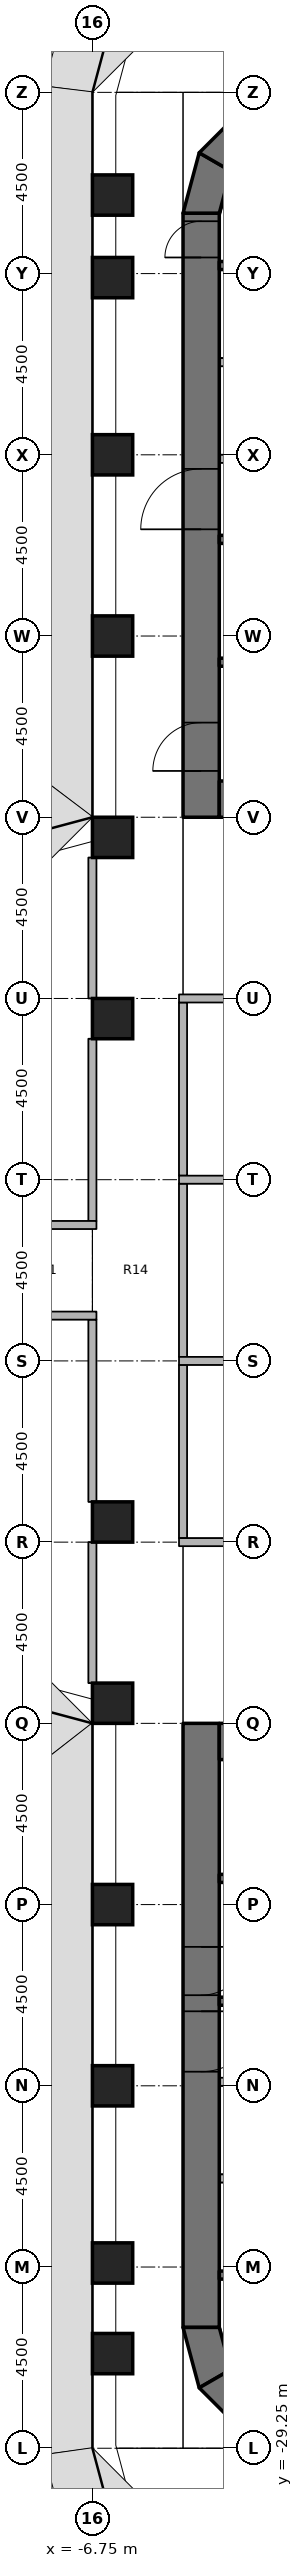
"""IFC4 building model, lengths in metres.
Left out: names, types, materials, properties, quantities, classifications, styles, units other than length and angle.
Written with IfcOpenShell. Run it as: python <this file> out.ifc"""

import sys

from ifc_helpers import new_model, si_unit, direction, frame, frame_2d, origin, origin_2d, place, context, subcontext, project, spatial, polyline, rectangle, outline, extrude, element, fill, save


model = new_model("IFC4")
c1 = context("Model", 3, precision=1e-05, world=origin(), true_north=direction((0.0, 1.0)))
c2 = subcontext(c1, "Body", "Model", "MODEL_VIEW")
j1 = project(units=[si_unit("LENGTHUNIT", "METRE"), si_unit("PLANEANGLEUNIT", "RADIAN")], contexts=[c1])
p1 = place(None, origin())
s1 = spatial("IfcSite", under=j1, at=p1, CompositionType="ELEMENT")
p2 = place(p1, origin())
s2 = spatial("IfcBuilding", under=s1, at=p2, CompositionType="ELEMENT")
p3 = place(p2, frame((0.0, 0.0, 69.0)))
s3 = spatial("IfcBuildingStorey", under=s2, at=p3, CompositionType="ELEMENT", Elevation=69.0)
for number, where, z_axis, x_axis in (
    (1, (-6.25, -26.9, 0.0), (0.0, 0.0, 1.0), (1.0, 0.0, 0.0)),
    (2, (-6.25, -24.65, 0.0), (0.0, 0.0, 1.0), (1.0, 0.0, 0.0)),
    (3, (-6.25, -20.25, 0.0), (0.0, 0.0, 1.0), (1.0, 0.0, 0.0)),
    (4, (-6.25, -15.75, 0.0), (0.0, 0.0, 1.0), (1.0, 0.0, 0.0)),
    (5, (-6.25, -10.75, 0.0), (0.0, 0.0, 1.0), (1.0, 0.0, 0.0)),
    (6, (-6.25, -6.25, 0.0), (0.0, 0.0, 1.0), (1.0, 0.0, 0.0)),
    (7, (-6.25, 6.25, 0.0), (0.0, 0.0, 1.0), (1.0, 0.0, 0.0)),
    (8, (-6.25, 10.75, 0.0), (0.0, 0.0, 1.0), (1.0, 0.0, 0.0)),
    (9, (-6.25, 15.75, 0.0), (0.0, 0.0, 1.0), (1.0, 0.0, 0.0)),
    (10, (-6.25, 20.25, 0.0), (0.0, 0.0, 1.0), (1.0, 0.0, 0.0)),
    (11, (-6.25, 24.65, 0.0), (0.0, 0.0, 1.0), (1.0, 0.0, 0.0)),
    (12, (-6.25, 26.7, 0.0), (0.0, 0.0, 1.0), (1.0, 0.0, 0.0)),
):
    element("IfcColumn", number, at=place(p3, frame(where, z_axis=z_axis, x_axis=x_axis)), inside=s3, PredefinedType="COLUMN", context=c2, shape_type="SweptSolid", body=[
        extrude(rectangle(XDim=1.0, YDim=1.0, at=origin_2d()), origin(), (0.0, 0.0, 1.0), 4.05),
    ])
p4 = place(p3, frame((-4.05, 11.25, 0.0), z_axis=(0.0, 0.0, 1.0), x_axis=(0.0, 1.0, 0.0)))
e13 = element("IfcWall", 13, at=p4, inside=s3, PredefinedType="SHEAR", context=c2, shape_type="SweptSolid", body=[
    extrude(rectangle(XDim=15.0, YDim=0.9, at=frame_2d((7.5, 0.0))), origin(), (0.0, 0.0, 1.0), 4.2),
])
p5 = place(p4, frame((7.15, 0.0, 0.0)))
e14 = element("IfcOpeningElement", 14, at=p5, cuts=e13, PredefinedType="OPENING", context=c2, shape_type="SweptSolid", body=[
    extrude(rectangle(XDim=1.5, YDim=2.3, at=frame_2d((0.75, 1.15))), frame((0.0, 0.46, 0.0), z_axis=(0.0, -1.0, 0.0), x_axis=(1.0, 0.0, 0.0)), (0.0, 0.0, 1.0), 0.92),
])
p6 = place(p4, frame((13.9, 0.0, 0.0)))
e15 = element("IfcOpeningElement", 15, at=p6, cuts=e13, PredefinedType="OPENING", context=c2, shape_type="SweptSolid", body=[
    extrude(rectangle(XDim=0.9, YDim=2.1, at=frame_2d((0.45, 1.05))), frame((0.0, 0.46, 0.0), z_axis=(0.0, -1.0, 0.0), x_axis=(1.0, 0.0, 0.0)), (0.0, 0.0, 1.0), 0.92),
])
p7 = place(p4, frame((1.15, 0.0, 0.0)))
e16 = element("IfcOpeningElement", 16, at=p7, cuts=e13, PredefinedType="OPENING", context=c2, shape_type="SweptSolid", body=[
    extrude(rectangle(XDim=1.2, YDim=2.1, at=frame_2d((0.6, 1.05))), frame((0.0, 0.46, 0.0), z_axis=(0.0, -1.0, 0.0), x_axis=(1.0, 0.0, 0.0)), (0.0, 0.0, 1.0), 0.92),
])
p8 = place(p3, frame((-3.6, 11.7, 0.0), z_axis=(0.0, 0.0, 1.0), x_axis=(1.0, 0.0, 0.0)))
e17 = element("IfcWall", 17, at=p8, inside=s3, PredefinedType="SHEAR", context=c2, shape_type="SweptSolid", body=[
    extrude(rectangle(XDim=7.2, YDim=0.9, at=frame_2d((3.6, 0.0))), origin(), (0.0, 0.0, 1.0), 4.2),
])
p9 = place(p3, origin())
e18 = element("IfcWall", 18, at=p9, inside=s3, PredefinedType="SHEAR", context=c2, shape_type="SweptSolid", body=[
    extrude(outline(polyline([(-4.5, 26.25), (-4.098, 27.75), (-3.319, 27.3), (-3.6, 26.25), (-4.5, 26.25)])), origin(), (0.0, 0.0, 1.0), 4.2),
])
p10 = place(p3, origin())
e19 = element("IfcWall", 19, at=p10, inside=s3, PredefinedType="SHEAR", context=c2, shape_type="SweptSolid", body=[
    extrude(outline(polyline([(-4.098, 27.75), (-3.0, 28.848), (-2.55, 28.069), (-3.319, 27.3), (-4.098, 27.75)])), origin(), (0.0, 0.0, 1.0), 4.2),
])
p11 = place(p3, frame((-4.05, -11.25, 0.0), z_axis=(0.0, 0.0, 1.0), x_axis=(0.0, -1.0, 0.0)))
e20 = element("IfcWall", 20, at=p11, inside=s3, PredefinedType="SHEAR", context=c2, shape_type="SweptSolid", body=[
    extrude(rectangle(XDim=15.0, YDim=0.9, at=frame_2d((7.5, 0.0))), origin(), (0.0, 0.0, 1.0), 4.2),
])
p12 = place(p11, frame((7.15, 0.0, 0.0)))
e21 = element("IfcOpeningElement", 21, at=p12, cuts=e20, PredefinedType="OPENING", context=c2, shape_type="SweptSolid", body=[
    extrude(rectangle(XDim=1.5, YDim=2.3, at=frame_2d((0.75, 1.15))), frame((0.0, 0.46, 0.0), z_axis=(0.0, -1.0, 0.0), x_axis=(1.0, 0.0, 0.0)), (0.0, 0.0, 1.0), 0.92),
])
p13 = place(p11, frame((5.55, 0.0, 0.0)))
e22 = element("IfcOpeningElement", 22, at=p13, cuts=e20, PredefinedType="OPENING", context=c2, shape_type="SweptSolid", body=[
    extrude(rectangle(XDim=1.2, YDim=2.1, at=frame_2d((0.6, 1.05))), frame((0.0, 0.46, 0.0), z_axis=(0.0, -1.0, 0.0), x_axis=(1.0, 0.0, 0.0)), (0.0, 0.0, 1.0), 0.92),
])
p14 = place(p3, frame((-3.6, -11.7, 0.0), z_axis=(0.0, 0.0, 1.0), x_axis=(1.0, 0.0, 0.0)))
e23 = element("IfcWall", 23, at=p14, inside=s3, PredefinedType="SHEAR", context=c2, shape_type="SweptSolid", body=[
    extrude(rectangle(XDim=7.2, YDim=0.9, at=frame_2d((3.6, 0.0))), origin(), (0.0, 0.0, 1.0), 4.2),
])
p15 = place(p3, origin())
e24 = element("IfcWall", 24, at=p15, inside=s3, PredefinedType="SHEAR", context=c2, shape_type="SweptSolid", body=[
    extrude(outline(polyline([(-4.5, -26.25), (-4.098, -27.75), (-3.319, -27.3), (-3.6, -26.25), (-4.5, -26.25)])), origin(), (0.0, 0.0, 1.0), 4.2),
])
p16 = place(p3, origin())
e25 = element("IfcWall", 25, at=p16, inside=s3, PredefinedType="SHEAR", context=c2, shape_type="SweptSolid", body=[
    extrude(outline(polyline([(-4.098, -27.75), (-3.0, -28.848), (-2.55, -28.069), (-3.319, -27.3), (-4.098, -27.75)])), origin(), (0.0, 0.0, 1.0), 4.2),
])
for number, where, z_axis, x_axis in (
    (26, (-3.6, 24.95, 0.0), (0.0, 0.0, 1.0), (1.0, 0.0, 0.0)),
    (27, (-3.6, 18.15, 0.0), (0.0, 0.0, 1.0), (1.0, 0.0, 0.0)),
    (28, (-3.6, 15.1, 0.0), (0.0, 0.0, 1.0), (1.0, 0.0, 0.0)),
):
    element("IfcWall", number, at=place(p3, frame(where, z_axis=z_axis, x_axis=x_axis)), inside=s3, PredefinedType="SHEAR", context=c2, shape_type="SweptSolid", body=[
        extrude(rectangle(XDim=7.2, YDim=0.2, at=frame_2d((3.6, 0.0))), origin(), (0.0, 0.0, 1.0), 4.05),
    ])
p17 = place(p3, frame((-3.6, 20.15, 0.0), z_axis=(0.0, 0.0, 1.0), x_axis=(1.0, 0.0, 0.0)))
e29 = element("IfcWall", 29, at=p17, inside=s3, PredefinedType="PARTITIONING", context=c2, shape_type="SweptSolid", body=[
    extrude(rectangle(XDim=2.7, YDim=0.2, at=frame_2d((1.35, 0.0))), origin(), (0.0, 0.0, 1.0), 4.05),
])
p18 = place(p3, frame((-3.6, 22.55, 0.0), z_axis=(0.0, 0.0, 1.0), x_axis=(1.0, 0.0, 0.0)))
e30 = element("IfcWall", 30, at=p18, inside=s3, PredefinedType="PARTITIONING", context=c2, shape_type="SweptSolid", body=[
    extrude(rectangle(XDim=2.5, YDim=0.2, at=frame_2d((1.25, 0.0))), origin(), (0.0, 0.0, 1.0), 4.05),
])
for number, where, z_axis, x_axis in (
    (31, (3.6, -24.95, 0.0), (0.0, 0.0, 1.0), (-1.0, 0.0, 0.0)),
    (32, (3.6, -18.15, 0.0), (0.0, 0.0, 1.0), (-1.0, 0.0, 0.0)),
    (33, (3.6, -15.1, 0.0), (0.0, 0.0, 1.0), (-1.0, 0.0, 0.0)),
):
    element("IfcWall", number, at=place(p3, frame(where, z_axis=z_axis, x_axis=x_axis)), inside=s3, PredefinedType="SHEAR", context=c2, shape_type="SweptSolid", body=[
        extrude(rectangle(XDim=7.2, YDim=0.2, at=frame_2d((3.6, 0.0))), origin(), (0.0, 0.0, 1.0), 4.05),
    ])
p19 = place(p3, frame((-0.9, -20.15, 0.0), z_axis=(0.0, 0.0, 1.0), x_axis=(-1.0, 0.0, 0.0)))
e34 = element("IfcWall", 34, at=p19, inside=s3, PredefinedType="PARTITIONING", context=c2, shape_type="SweptSolid", body=[
    extrude(rectangle(XDim=2.7, YDim=0.2, at=frame_2d((1.35, 0.0))), origin(), (0.0, 0.0, 1.0), 4.05),
])
p20 = place(p3, frame((-1.1, -22.55, 0.0), z_axis=(0.0, 0.0, 1.0), x_axis=(-1.0, 0.0, 0.0)))
e35 = element("IfcWall", 35, at=p20, inside=s3, PredefinedType="PARTITIONING", context=c2, shape_type="SweptSolid", body=[
    extrude(rectangle(XDim=2.5, YDim=0.2, at=frame_2d((1.25, 0.0))), origin(), (0.0, 0.0, 1.0), 4.05),
])
for number, where, z_axis, x_axis in (
    (36, (-4.5, 2.35, 0.0), (0.0, 0.0, 1.0), (0.0, 1.0, 0.0)),
    (37, (-4.5, -2.15, 0.0), (0.0, 0.0, 1.0), (0.0, 1.0, 0.0)),
    (38, (-4.5, -6.65, 0.0), (0.0, 0.0, 1.0), (0.0, 1.0, 0.0)),
):
    element("IfcWall", number, at=place(p3, frame(where, z_axis=z_axis, x_axis=x_axis)), inside=s3, PredefinedType="PARTITIONING", context=c2, shape_type="SweptSolid", body=[
        extrude(rectangle(XDim=4.3, YDim=0.2, at=frame_2d((2.15, 0.0))), origin(), (0.0, 0.0, 1.0), 3.131),
    ])
p21 = place(p3, frame((-6.75, 1.225, 0.0), z_axis=(0.0, 0.0, 1.0), x_axis=(0.0, 1.0, 0.0)))
e39 = element("IfcWall", 39, at=p21, inside=s3, PredefinedType="PARTITIONING", context=c2, shape_type="SweptSolid", body=[
    extrude(rectangle(XDim=4.525, YDim=0.2, at=frame_2d((2.262, 0.0))), origin(), (0.0, 0.0, 1.0), 3.131),
])
for number, where, z_axis, x_axis in (
    (40, (-6.75, 6.75, 0.0), (0.0, 0.0, 1.0), (0.0, 1.0, 0.0)),
    (41, (-6.75, -10.25, 0.0), (0.0, 0.0, 1.0), (0.0, 1.0, 0.0)),
):
    element("IfcWall", number, at=place(p3, frame(where, z_axis=z_axis, x_axis=x_axis)), inside=s3, PredefinedType="PARTITIONING", context=c2, shape_type="SweptSolid", body=[
        extrude(rectangle(XDim=3.5, YDim=0.2, at=frame_2d((1.75, 0.0))), origin(), (0.0, 0.0, 1.0), 3.131),
    ])
p22 = place(p3, frame((-6.75, -5.75, 0.0), z_axis=(0.0, 0.0, 1.0), x_axis=(0.0, 1.0, 0.0)))
e42 = element("IfcWall", 42, at=p22, inside=s3, PredefinedType="PARTITIONING", context=c2, shape_type="SweptSolid", body=[
    extrude(rectangle(XDim=4.525, YDim=0.2, at=frame_2d((2.262, 0.0))), origin(), (0.0, 0.0, 1.0), 3.131),
])
p23 = place(p3, frame((4.6, 6.75, 0.0), z_axis=(0.0, 0.0, 1.0), x_axis=(-1.0, 0.0, 0.0)))
e43 = element("IfcWall", 43, at=p23, inside=s3, PredefinedType="PARTITIONING", context=c2, shape_type="SweptSolid", body=[
    extrude(rectangle(XDim=9.2, YDim=0.2, at=frame_2d((4.6, 0.0))), origin(), (0.0, 0.0, 1.0), 3.131),
])
p24 = place(p23, frame((4.1, 0.0, 0.0)))
e44 = element("IfcOpeningElement", 44, at=p24, cuts=e43, PredefinedType="OPENING", context=c2, shape_type="SweptSolid", body=[
    extrude(rectangle(XDim=1.0, YDim=2.1, at=frame_2d((0.5, 1.05))), frame((0.0, 0.11, 0.0), z_axis=(0.0, -1.0, 0.0), x_axis=(1.0, 0.0, 0.0)), (0.0, 0.0, 1.0), 0.22),
])
p25 = place(p3, frame((-4.6, -6.75, 0.0), z_axis=(0.0, 0.0, 1.0), x_axis=(1.0, 0.0, 0.0)))
e45 = element("IfcWall", 45, at=p25, inside=s3, PredefinedType="PARTITIONING", context=c2, shape_type="SweptSolid", body=[
    extrude(rectangle(XDim=9.2, YDim=0.2, at=frame_2d((4.6, 0.0))), origin(), (0.0, 0.0, 1.0), 3.131),
])
p26 = place(p25, frame((4.1, 0.0, 0.0)))
e46 = element("IfcOpeningElement", 46, at=p26, cuts=e45, PredefinedType="OPENING", context=c2, shape_type="SweptSolid", body=[
    extrude(rectangle(XDim=1.0, YDim=2.1, at=frame_2d((0.5, 1.05))), frame((0.0, 0.11, 0.0), z_axis=(0.0, -1.0, 0.0), x_axis=(1.0, 0.0, 0.0)), (0.0, 0.0, 1.0), 0.22),
])
for number, where, z_axis, x_axis in (
    (47, (-4.6, 2.25, 0.0), (0.0, 0.0, 1.0), (1.0, 0.0, 0.0)),
    (48, (-4.6, -2.25, 0.0), (0.0, 0.0, 1.0), (1.0, 0.0, 0.0)),
):
    element("IfcWall", number, at=place(p3, frame(where, z_axis=z_axis, x_axis=x_axis)), inside=s3, PredefinedType="PARTITIONING", context=c2, shape_type="SweptSolid", body=[
        extrude(rectangle(XDim=9.2, YDim=0.2, at=frame_2d((4.6, 0.0))), origin(), (0.0, 0.0, 1.0), 3.131),
    ])
p27 = place(p3, frame((-11.35, 1.125, 0.0), z_axis=(0.0, 0.0, 1.0), x_axis=(1.0, 0.0, 0.0)))
e49 = element("IfcWall", 49, at=p27, inside=s3, PredefinedType="PARTITIONING", context=c2, shape_type="SweptSolid", body=[
    extrude(rectangle(XDim=4.7, YDim=0.2, at=frame_2d((2.35, 0.0))), origin(), (0.0, 0.0, 1.0), 3.131),
])
p28 = place(p27, frame((1.85, 0.0, 0.0)))
e50 = element("IfcOpeningElement", 50, at=p28, cuts=e49, PredefinedType="OPENING", context=c2, shape_type="SweptSolid", body=[
    extrude(rectangle(XDim=1.0, YDim=2.1, at=frame_2d((0.5, 1.05))), frame((0.0, 0.11, 0.0), z_axis=(0.0, -1.0, 0.0), x_axis=(1.0, 0.0, 0.0)), (0.0, 0.0, 1.0), 0.22),
])
p29 = place(p3, frame((-6.65, -1.125, 0.0), z_axis=(0.0, 0.0, 1.0), x_axis=(-1.0, 0.0, 0.0)))
e51 = element("IfcWall", 51, at=p29, inside=s3, PredefinedType="PARTITIONING", context=c2, shape_type="SweptSolid", body=[
    extrude(rectangle(XDim=4.7, YDim=0.2, at=frame_2d((2.35, 0.0))), origin(), (0.0, 0.0, 1.0), 3.131),
])
p30 = place(p29, frame((1.85, 0.0, 0.0)))
e52 = element("IfcOpeningElement", 52, at=p30, cuts=e51, PredefinedType="OPENING", context=c2, shape_type="SweptSolid", body=[
    extrude(rectangle(XDim=1.0, YDim=2.1, at=frame_2d((0.5, 1.05))), frame((0.0, 0.11, 0.0), z_axis=(0.0, -1.0, 0.0), x_axis=(1.0, 0.0, 0.0)), (0.0, 0.0, 1.0), 0.22),
])
p31 = place(p5, origin())
e53 = element("IfcDoor", 53, at=p31, inside=s3, OperationType="DOUBLE_DOOR_SINGLE_SWING", PredefinedType="DOOR", context=c2, shape_type="SweptSolid", body=[
    extrude(rectangle(XDim=1.5, YDim=2.3, at=frame_2d((0.75, 1.15))), frame((0.0, 0.025, 0.0), z_axis=(0.0, -1.0, 0.0), x_axis=(1.0, 0.0, 0.0)), (0.0, 0.0, 1.0), 0.05),
])
fill(e14, e53)
p32 = place(p6, origin())
e54 = element("IfcDoor", 54, at=p32, inside=s3, OperationType="SINGLE_SWING_RIGHT", PredefinedType="DOOR", context=c2, shape_type="SweptSolid", body=[
    extrude(rectangle(XDim=0.9, YDim=2.1, at=frame_2d((0.45, 1.05))), frame((0.0, 0.025, 0.0), z_axis=(0.0, -1.0, 0.0), x_axis=(1.0, 0.0, 0.0)), (0.0, 0.0, 1.0), 0.05),
])
fill(e15, e54)
p33 = place(p7, origin())
e55 = element("IfcDoor", 55, at=p33, inside=s3, OperationType="SINGLE_SWING_LEFT", PredefinedType="DOOR", context=c2, shape_type="SweptSolid", body=[
    extrude(rectangle(XDim=1.2, YDim=2.1, at=frame_2d((0.6, 1.05))), frame((0.0, 0.025, 0.0), z_axis=(0.0, -1.0, 0.0), x_axis=(1.0, 0.0, 0.0)), (0.0, 0.0, 1.0), 0.05),
])
fill(e16, e55)
p34 = place(p12, origin())
e56 = element("IfcDoor", 56, at=p34, inside=s3, OperationType="DOUBLE_DOOR_SINGLE_SWING", PredefinedType="DOOR", context=c2, shape_type="SweptSolid", body=[
    extrude(rectangle(XDim=1.5, YDim=2.3, at=frame_2d((0.75, 1.15))), frame((0.0, 0.025, 0.0), z_axis=(0.0, -1.0, 0.0), x_axis=(1.0, 0.0, 0.0)), (0.0, 0.0, 1.0), 0.05),
])
fill(e21, e56)
p35 = place(p13, origin())
e57 = element("IfcDoor", 57, at=p35, inside=s3, OperationType="SINGLE_SWING_RIGHT", PredefinedType="DOOR", context=c2, shape_type="SweptSolid", body=[
    extrude(rectangle(XDim=1.2, YDim=2.1, at=frame_2d((0.6, 1.05))), frame((0.0, 0.025, 0.0), z_axis=(0.0, -1.0, 0.0), x_axis=(1.0, 0.0, 0.0)), (0.0, 0.0, 1.0), 0.05),
])
fill(e22, e57)
save(model, sys.argv[1])
